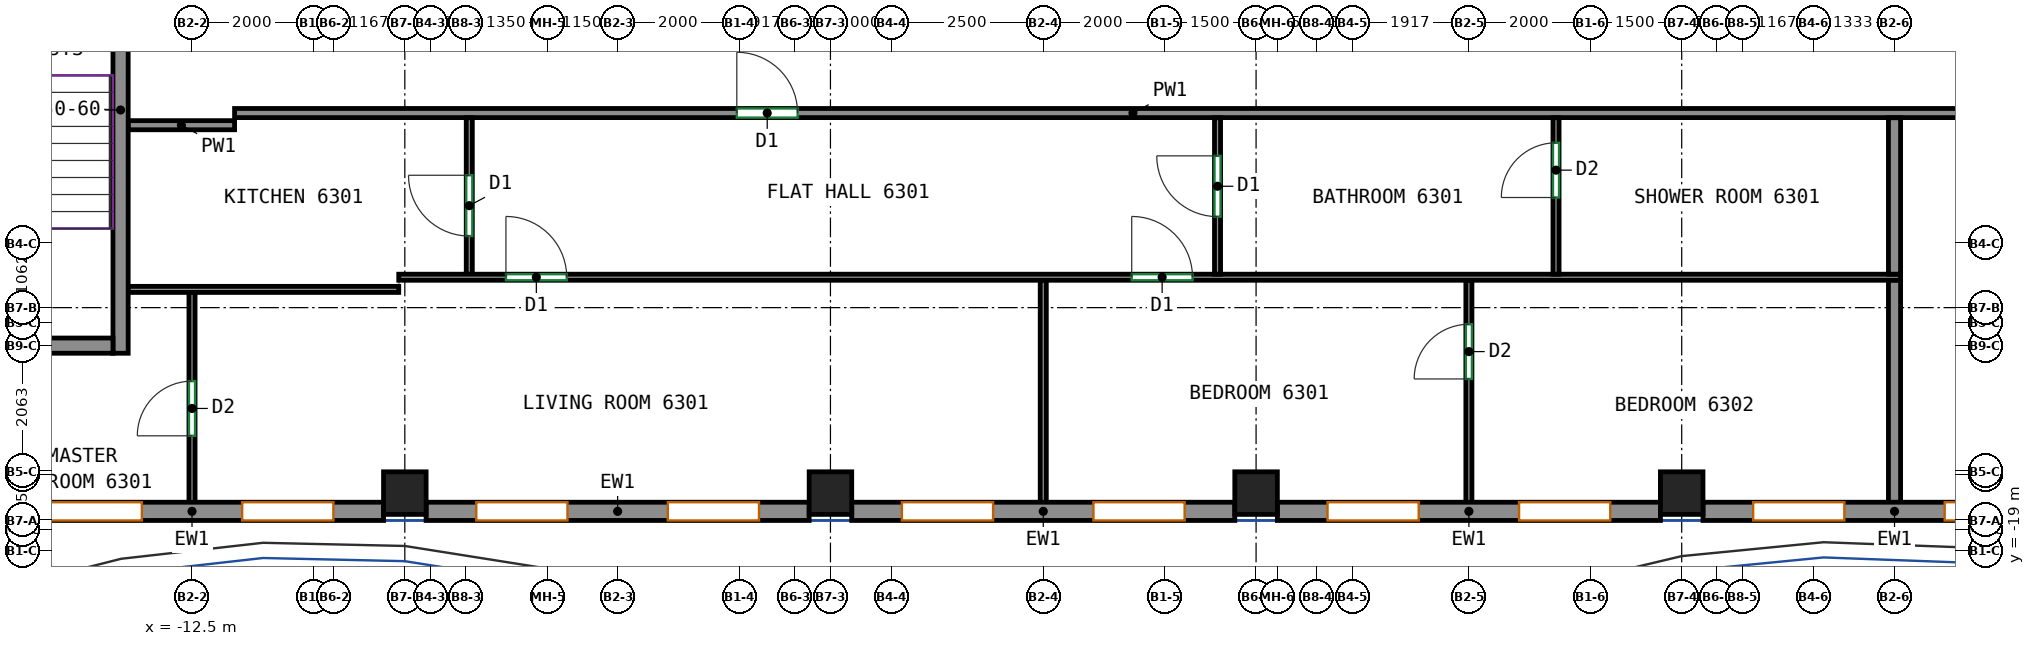
"""IFC4 building model, lengths in metres.
Left out: names, types, materials, properties, quantities, classifications, styles, units other than length and angle.
Written with IfcOpenShell. Run it as: python <this file> out.ifc"""

import sys

from ifc_helpers import new_model, si_unit, direction, frame, frame_2d, origin, origin_2d, place, context, subcontext, project, spatial, rectangle, extrude, source, transform, mapped, element, fill, save


model = new_model("IFC4")
c1 = context("Model", 3, precision=1e-05, world=origin(), true_north=direction((0.0, 1.0)))
c2 = subcontext(c1, "Body", "Model", "MODEL_VIEW")
j1 = project(units=[si_unit("LENGTHUNIT", "METRE"), si_unit("PLANEANGLEUNIT", "RADIAN")], contexts=[c1])
p1 = place(None, origin())
s1 = spatial("IfcSite", under=j1, at=p1, CompositionType="ELEMENT")
p2 = place(p1, origin())
s2 = spatial("IfcBuilding", under=s1, at=p2, CompositionType="ELEMENT")
p3 = place(p2, frame((0.0, 0.0, 259.4)))
s3 = spatial("IfcBuildingStorey", under=s2, at=p3, CompositionType="ELEMENT", Elevation=259.4)
m1 = source(origin(), c2, "Body", "SweptSolid", [
    extrude(rectangle(XDim=0.7, YDim=0.7, at=origin_2d()), origin(), (0.0, 0.0, 1.0), 3.0),
])
for number, where, z_axis, x_axis in (
    (1, (-9.0, -18.05, 0.0), (0.0, 0.0, 1.0), (1.0, 0.0, 0.0)),
    (2, (-2.0, -18.05, 0.0), (0.0, 0.0, 1.0), (1.0, 0.0, 0.0)),
    (3, (5.0, -18.05, 0.0), (0.0, 0.0, 1.0), (1.0, 0.0, 0.0)),
    (4, (12.0, -18.05, 0.0), (0.0, 0.0, 1.0), (1.0, 0.0, 0.0)),
):
    element("IfcColumn", number, at=place(p3, frame(where, z_axis=z_axis, x_axis=x_axis)), inside=s3, PredefinedType="COLUMN", context=c2, shape_type="MappedRepresentation", body=[
        mapped(m1, transform((0.0, 0.0, 0.0))),
    ])
m2 = source(origin(), c2, "Body", "SweptSolid", [
    extrude(rectangle(XDim=8.0, YDim=0.25, at=frame_2d((4.0, 0.0))), origin(), (0.0, 0.0, 1.0), 3.0),
])
p4 = place(p3, frame((-13.675, -15.75, 0.0), z_axis=(0.0, 0.0, 1.0), x_axis=(0.0, 1.0, 0.0)))
e5 = element("IfcWall", 5, at=p4, inside=s3, PredefinedType="SHEAR", context=c2, shape_type="MappedRepresentation", body=[
    mapped(m2, transform((0.0, 0.0, 0.0))),
])
m3 = source(origin(), c2, "Body", "SweptSolid", [
    extrude(rectangle(XDim=3.7, YDim=0.25, at=frame_2d((1.85, 0.0))), origin(), (0.0, 0.0, 1.0), 3.0),
])
p5 = place(p3, frame((-17.5, -15.625, 0.0), z_axis=(0.0, 0.0, 1.0), x_axis=(1.0, 0.0, 0.0)))
e6 = element("IfcWall", 6, at=p5, inside=s3, PredefinedType="SHEAR", context=c2, shape_type="MappedRepresentation", body=[
    mapped(m3, transform((0.0, 0.0, 0.0))),
])
p6 = place(p5, frame((1.25, 0.0, 0.0)))
e7 = element("IfcOpeningElement", 7, at=p6, cuts=e6, PredefinedType="OPENING", context=c2, shape_type="SweptSolid", body=[
    extrude(rectangle(XDim=1.2, YDim=2.1, at=frame_2d((0.6, 1.05))), frame((0.0, 0.135, 0.0), z_axis=(0.0, -1.0, 0.0), x_axis=(1.0, 0.0, 0.0)), (0.0, 0.0, 1.0), 0.27),
])
m4 = source(origin(), c2, "Body", "SweptSolid", [
    extrude(rectangle(XDim=6.3, YDim=0.3, at=frame_2d((3.15, 0.0))), origin(), (0.0, 0.0, 1.0), 3.0),
])
p7 = place(p3, frame((-15.65, -18.35, 0.0), z_axis=(0.0, 0.0, 1.0), x_axis=(1.0, 0.0, 0.0)))
e8 = element("IfcWall", 8, at=p7, inside=s3, PredefinedType="SOLIDWALL", context=c2, shape_type="MappedRepresentation", body=[
    mapped(m4, transform((0.0, 0.0, 0.0))),
])
p8 = place(p7, frame((0.825, 0.0, 0.8)))
e9 = element("IfcOpeningElement", 9, at=p8, cuts=e8, PredefinedType="OPENING", context=c2, shape_type="SweptSolid", body=[
    extrude(rectangle(XDim=1.5, YDim=2.05, at=frame_2d((0.75, 1.025))), frame((0.0, 0.16, 0.0), z_axis=(0.0, -1.0, 0.0), x_axis=(1.0, 0.0, 0.0)), (0.0, 0.0, 1.0), 0.32),
])
p9 = place(p7, frame((3.975, 0.0, 0.8)))
e10 = element("IfcOpeningElement", 10, at=p9, cuts=e8, PredefinedType="OPENING", context=c2, shape_type="SweptSolid", body=[
    extrude(rectangle(XDim=1.5, YDim=2.05, at=frame_2d((0.75, 1.025))), frame((0.0, 0.16, 0.0), z_axis=(0.0, -1.0, 0.0), x_axis=(1.0, 0.0, 0.0)), (0.0, 0.0, 1.0), 0.32),
])
p10 = place(p3, frame((-8.65, -18.35, 0.0), z_axis=(0.0, 0.0, 1.0), x_axis=(1.0, 0.0, 0.0)))
e11 = element("IfcWall", 11, at=p10, inside=s3, PredefinedType="SOLIDWALL", context=c2, shape_type="MappedRepresentation", body=[
    mapped(m4, transform((0.0, 0.0, 0.0))),
])
p11 = place(p10, frame((0.825, 0.0, 0.8)))
e12 = element("IfcOpeningElement", 12, at=p11, cuts=e11, PredefinedType="OPENING", context=c2, shape_type="SweptSolid", body=[
    extrude(rectangle(XDim=1.5, YDim=2.05, at=frame_2d((0.75, 1.025))), frame((0.0, 0.16, 0.0), z_axis=(0.0, -1.0, 0.0), x_axis=(1.0, 0.0, 0.0)), (0.0, 0.0, 1.0), 0.32),
])
p12 = place(p10, frame((3.975, 0.0, 0.8)))
e13 = element("IfcOpeningElement", 13, at=p12, cuts=e11, PredefinedType="OPENING", context=c2, shape_type="SweptSolid", body=[
    extrude(rectangle(XDim=1.5, YDim=2.05, at=frame_2d((0.75, 1.025))), frame((0.0, 0.16, 0.0), z_axis=(0.0, -1.0, 0.0), x_axis=(1.0, 0.0, 0.0)), (0.0, 0.0, 1.0), 0.32),
])
p13 = place(p3, frame((-1.65, -18.35, 0.0), z_axis=(0.0, 0.0, 1.0), x_axis=(1.0, 0.0, 0.0)))
e14 = element("IfcWall", 14, at=p13, inside=s3, PredefinedType="SOLIDWALL", context=c2, shape_type="MappedRepresentation", body=[
    mapped(m4, transform((0.0, 0.0, 0.0))),
])
p14 = place(p13, frame((0.825, 0.0, 0.8)))
e15 = element("IfcOpeningElement", 15, at=p14, cuts=e14, PredefinedType="OPENING", context=c2, shape_type="SweptSolid", body=[
    extrude(rectangle(XDim=1.5, YDim=2.05, at=frame_2d((0.75, 1.025))), frame((0.0, 0.16, 0.0), z_axis=(0.0, -1.0, 0.0), x_axis=(1.0, 0.0, 0.0)), (0.0, 0.0, 1.0), 0.32),
])
p15 = place(p13, frame((3.975, 0.0, 0.8)))
e16 = element("IfcOpeningElement", 16, at=p15, cuts=e14, PredefinedType="OPENING", context=c2, shape_type="SweptSolid", body=[
    extrude(rectangle(XDim=1.5, YDim=2.05, at=frame_2d((0.75, 1.025))), frame((0.0, 0.16, 0.0), z_axis=(0.0, -1.0, 0.0), x_axis=(1.0, 0.0, 0.0)), (0.0, 0.0, 1.0), 0.32),
])
p16 = place(p3, frame((5.35, -18.35, 0.0), z_axis=(0.0, 0.0, 1.0), x_axis=(1.0, 0.0, 0.0)))
e17 = element("IfcWall", 17, at=p16, inside=s3, PredefinedType="SOLIDWALL", context=c2, shape_type="MappedRepresentation", body=[
    mapped(m4, transform((0.0, 0.0, 0.0))),
])
p17 = place(p16, frame((0.825, 0.0, 0.8)))
e18 = element("IfcOpeningElement", 18, at=p17, cuts=e17, PredefinedType="OPENING", context=c2, shape_type="SweptSolid", body=[
    extrude(rectangle(XDim=1.5, YDim=2.05, at=frame_2d((0.75, 1.025))), frame((0.0, 0.16, 0.0), z_axis=(0.0, -1.0, 0.0), x_axis=(1.0, 0.0, 0.0)), (0.0, 0.0, 1.0), 0.32),
])
p18 = place(p16, frame((3.975, 0.0, 0.8)))
e19 = element("IfcOpeningElement", 19, at=p18, cuts=e17, PredefinedType="OPENING", context=c2, shape_type="SweptSolid", body=[
    extrude(rectangle(XDim=1.5, YDim=2.05, at=frame_2d((0.75, 1.025))), frame((0.0, 0.16, 0.0), z_axis=(0.0, -1.0, 0.0), x_axis=(1.0, 0.0, 0.0)), (0.0, 0.0, 1.0), 0.32),
])
p19 = place(p3, frame((12.35, -18.35, 0.0), z_axis=(0.0, 0.0, 1.0), x_axis=(1.0, 0.0, 0.0)))
e20 = element("IfcWall", 20, at=p19, inside=s3, PredefinedType="SOLIDWALL", context=c2, shape_type="MappedRepresentation", body=[
    mapped(m4, transform((0.0, 0.0, 0.0))),
])
p20 = place(p19, frame((0.825, 0.0, 0.8)))
e21 = element("IfcOpeningElement", 21, at=p20, cuts=e20, PredefinedType="OPENING", context=c2, shape_type="SweptSolid", body=[
    extrude(rectangle(XDim=1.5, YDim=2.05, at=frame_2d((0.75, 1.025))), frame((0.0, 0.16, 0.0), z_axis=(0.0, -1.0, 0.0), x_axis=(1.0, 0.0, 0.0)), (0.0, 0.0, 1.0), 0.32),
])
p21 = place(p19, frame((3.975, 0.0, 0.8)))
e22 = element("IfcOpeningElement", 22, at=p21, cuts=e20, PredefinedType="OPENING", context=c2, shape_type="SweptSolid", body=[
    extrude(rectangle(XDim=1.5, YDim=2.05, at=frame_2d((0.75, 1.025))), frame((0.0, 0.16, 0.0), z_axis=(0.0, -1.0, 0.0), x_axis=(1.0, 0.0, 0.0)), (0.0, 0.0, 1.0), 0.32),
])
p22 = place(p3, frame((-11.8, -11.8, 0.0), z_axis=(0.0, 0.0, 1.0), x_axis=(1.0, 0.0, 0.0)))
e23 = element("IfcWall", 23, at=p22, inside=s3, PredefinedType="PARTITIONING", context=c2, shape_type="SweptSolid", body=[
    extrude(rectangle(XDim=29.55, YDim=0.15, at=frame_2d((14.775, 0.0))), origin(), (0.0, 0.0, 1.0), 3.0),
])
p23 = place(p22, frame((8.26, 0.0, 0.0)))
e24 = element("IfcOpeningElement", 24, at=p23, cuts=e23, PredefinedType="OPENING", context=c2, shape_type="SweptSolid", body=[
    extrude(rectangle(XDim=1.0, YDim=2.1, at=frame_2d((0.5, 1.05))), frame((0.0, 0.085, 0.0), z_axis=(0.0, -1.0, 0.0), x_axis=(1.0, 0.0, 0.0)), (0.0, 0.0, 1.0), 0.17),
])
p24 = place(p3, frame((-13.55, -12.0, 0.0), z_axis=(0.0, 0.0, 1.0), x_axis=(1.0, 0.0, 0.0)))
e25 = element("IfcWall", 25, at=p24, inside=s3, PredefinedType="PARTITIONING", context=c2, shape_type="SweptSolid", body=[
    extrude(rectangle(XDim=1.75, YDim=0.15, at=frame_2d((0.875, 0.0))), origin(), (0.0, 0.0, 1.0), 3.0),
])
p25 = place(p3, frame((-7.94, -14.45, 0.0), z_axis=(0.0, 0.0, 1.0), x_axis=(0.0, 1.0, 0.0)))
e26 = element("IfcWall", 26, at=p25, inside=s3, PredefinedType="PARTITIONING", context=c2, shape_type="SweptSolid", body=[
    extrude(rectangle(XDim=2.573, YDim=0.1, at=frame_2d((1.287, 0.0))), origin(), (0.0, 0.0, 1.0), 3.0),
])
p26 = place(p25, frame((0.627, 0.0, 0.0)))
e27 = element("IfcOpeningElement", 27, at=p26, cuts=e26, PredefinedType="OPENING", context=c2, shape_type="SweptSolid", body=[
    extrude(rectangle(XDim=1.0, YDim=2.1, at=frame_2d((0.5, 1.05))), frame((0.0, 0.06, 0.0), z_axis=(0.0, -1.0, 0.0), x_axis=(1.0, 0.0, 0.0)), (0.0, 0.0, 1.0), 0.12),
])
p27 = place(p3, frame((-13.55, -14.7, 0.0), z_axis=(0.0, 0.0, 1.0), x_axis=(1.0, 0.0, 0.0)))
e28 = element("IfcWall", 28, at=p27, inside=s3, PredefinedType="PARTITIONING", context=c2, shape_type="SweptSolid", body=[
    extrude(rectangle(XDim=4.45, YDim=0.1, at=frame_2d((2.225, 0.0))), origin(), (0.0, 0.0, 1.0), 3.0),
])
p28 = place(p3, frame((-9.1, -14.5, 0.0), z_axis=(0.0, 0.0, 1.0), x_axis=(1.0, 0.0, 0.0)))
e29 = element("IfcWall", 29, at=p28, inside=s3, PredefinedType="PARTITIONING", context=c2, shape_type="SweptSolid", body=[
    extrude(rectangle(XDim=24.7, YDim=0.1, at=frame_2d((12.35, 0.0))), origin(), (0.0, 0.0, 1.0), 3.0),
])
p29 = place(p28, frame((1.763, 0.0, 0.0)))
e30 = element("IfcOpeningElement", 30, at=p29, cuts=e29, PredefinedType="OPENING", context=c2, shape_type="SweptSolid", body=[
    extrude(rectangle(XDim=1.0, YDim=2.1, at=frame_2d((0.5, 1.05))), frame((0.0, 0.06, 0.0), z_axis=(0.0, -1.0, 0.0), x_axis=(1.0, 0.0, 0.0)), (0.0, 0.0, 1.0), 0.12),
])
p30 = place(p28, frame((12.055, 0.0, 0.0)))
e31 = element("IfcOpeningElement", 31, at=p30, cuts=e29, PredefinedType="OPENING", context=c2, shape_type="SweptSolid", body=[
    extrude(rectangle(XDim=1.0, YDim=2.1, at=frame_2d((0.5, 1.05))), frame((0.0, 0.06, 0.0), z_axis=(0.0, -1.0, 0.0), x_axis=(1.0, 0.0, 0.0)), (0.0, 0.0, 1.0), 0.12),
])
p31 = place(p3, frame((4.366, -14.45, 0.0), z_axis=(0.0, 0.0, 1.0), x_axis=(0.0, 1.0, 0.0)))
e32 = element("IfcWall", 32, at=p31, inside=s3, PredefinedType="PARTITIONING", context=c2, shape_type="SweptSolid", body=[
    extrude(rectangle(XDim=2.573, YDim=0.1, at=frame_2d((1.287, 0.0))), origin(), (0.0, 0.0, 1.0), 3.0),
])
p32 = place(p31, frame((0.946, 0.0, 0.0)))
e33 = element("IfcOpeningElement", 33, at=p32, cuts=e32, PredefinedType="OPENING", context=c2, shape_type="SweptSolid", body=[
    extrude(rectangle(XDim=1.0, YDim=2.1, at=frame_2d((0.5, 1.05))), frame((0.0, 0.06, 0.0), z_axis=(0.0, -1.0, 0.0), x_axis=(1.0, 0.0, 0.0)), (0.0, 0.0, 1.0), 0.12),
])
p33 = place(p3, frame((9.933, -14.45, 0.0), z_axis=(0.0, 0.0, 1.0), x_axis=(0.0, 1.0, 0.0)))
e34 = element("IfcWall", 34, at=p33, inside=s3, PredefinedType="PARTITIONING", context=c2, shape_type="SweptSolid", body=[
    extrude(rectangle(XDim=2.573, YDim=0.1, at=frame_2d((1.287, 0.0))), origin(), (0.0, 0.0, 1.0), 3.0),
])
p34 = place(p33, frame((1.261, 0.0, 0.0)))
e35 = element("IfcOpeningElement", 35, at=p34, cuts=e34, PredefinedType="OPENING", context=c2, shape_type="SweptSolid", body=[
    extrude(rectangle(XDim=0.9, YDim=2.1, at=frame_2d((0.45, 1.05))), frame((0.0, 0.06, 0.0), z_axis=(0.0, -1.0, 0.0), x_axis=(1.0, 0.0, 0.0)), (0.0, 0.0, 1.0), 0.12),
])
p35 = place(p3, frame((15.5, -14.45, 0.0), z_axis=(0.0, 0.0, 1.0), x_axis=(0.0, 1.0, 0.0)))
e36 = element("IfcWall", 36, at=p35, inside=s3, PredefinedType="PARTITIONING", context=c2, shape_type="SweptSolid", body=[
    extrude(rectangle(XDim=2.573, YDim=0.2, at=frame_2d((1.287, 0.0))), origin(), (0.0, 0.0, 1.0), 3.0),
])
p36 = place(p3, frame((-12.5, -18.25, 0.0), z_axis=(0.0, 0.0, 1.0), x_axis=(0.0, 1.0, 0.0)))
e37 = element("IfcWall", 37, at=p36, inside=s3, PredefinedType="PARTITIONING", context=c2, shape_type="SweptSolid", body=[
    extrude(rectangle(XDim=3.498, YDim=0.1, at=frame_2d((1.749, 0.0))), origin(), (0.0, 0.0, 1.0), 3.0),
])
p37 = place(p36, frame((1.142, 0.0, 0.0)))
e38 = element("IfcOpeningElement", 38, at=p37, cuts=e37, PredefinedType="OPENING", context=c2, shape_type="SweptSolid", body=[
    extrude(rectangle(XDim=0.9, YDim=2.1, at=frame_2d((0.45, 1.05))), frame((0.0, 0.06, 0.0), z_axis=(0.0, -1.0, 0.0), x_axis=(1.0, 0.0, 0.0)), (0.0, 0.0, 1.0), 0.12),
])
p38 = place(p3, frame((1.5, -18.25, 0.0), z_axis=(0.0, 0.0, 1.0), x_axis=(0.0, 1.0, 0.0)))
e39 = element("IfcWall", 39, at=p38, inside=s3, PredefinedType="PARTITIONING", context=c2, shape_type="SweptSolid", body=[
    extrude(rectangle(XDim=3.698, YDim=0.1, at=frame_2d((1.849, 0.0))), origin(), (0.0, 0.0, 1.0), 3.0),
])
p39 = place(p3, frame((8.5, -18.25, 0.0), z_axis=(0.0, 0.0, 1.0), x_axis=(0.0, 1.0, 0.0)))
e40 = element("IfcWall", 40, at=p39, inside=s3, PredefinedType="PARTITIONING", context=c2, shape_type="SweptSolid", body=[
    extrude(rectangle(XDim=3.698, YDim=0.1, at=frame_2d((1.849, 0.0))), origin(), (0.0, 0.0, 1.0), 3.0),
])
p40 = place(p39, frame((2.077, 0.0, 0.0)))
e41 = element("IfcOpeningElement", 41, at=p40, cuts=e40, PredefinedType="OPENING", context=c2, shape_type="SweptSolid", body=[
    extrude(rectangle(XDim=0.9, YDim=2.1, at=frame_2d((0.45, 1.05))), frame((0.0, 0.06, 0.0), z_axis=(0.0, -1.0, 0.0), x_axis=(1.0, 0.0, 0.0)), (0.0, 0.0, 1.0), 0.12),
])
p41 = place(p3, frame((15.5, -18.25, 0.0), z_axis=(0.0, 0.0, 1.0), x_axis=(0.0, 1.0, 0.0)))
e42 = element("IfcWall", 42, at=p41, inside=s3, PredefinedType="PARTITIONING", context=c2, shape_type="SweptSolid", body=[
    extrude(rectangle(XDim=3.698, YDim=0.2, at=frame_2d((1.849, 0.0))), origin(), (0.0, 0.0, 1.0), 3.0),
])
p42 = place(p8, origin())
e43 = element("IfcWindow", 43, at=p42, inside=s3, PartitioningType="SINGLE_PANEL", PredefinedType="WINDOW", context=c2, shape_type="SweptSolid", body=[
    extrude(rectangle(XDim=1.5, YDim=2.05, at=frame_2d((0.75, 1.025))), frame((0.0, 0.03, 0.0), z_axis=(0.0, -1.0, 0.0), x_axis=(1.0, 0.0, 0.0)), (0.0, 0.0, 1.0), 0.06),
])
fill(e9, e43)
p43 = place(p9, origin())
e44 = element("IfcWindow", 44, at=p43, inside=s3, PartitioningType="SINGLE_PANEL", PredefinedType="WINDOW", context=c2, shape_type="SweptSolid", body=[
    extrude(rectangle(XDim=1.5, YDim=2.05, at=frame_2d((0.75, 1.025))), frame((0.0, 0.03, 0.0), z_axis=(0.0, -1.0, 0.0), x_axis=(1.0, 0.0, 0.0)), (0.0, 0.0, 1.0), 0.06),
])
fill(e10, e44)
p44 = place(p11, origin())
e45 = element("IfcWindow", 45, at=p44, inside=s3, PartitioningType="SINGLE_PANEL", PredefinedType="WINDOW", context=c2, shape_type="SweptSolid", body=[
    extrude(rectangle(XDim=1.5, YDim=2.05, at=frame_2d((0.75, 1.025))), frame((0.0, 0.03, 0.0), z_axis=(0.0, -1.0, 0.0), x_axis=(1.0, 0.0, 0.0)), (0.0, 0.0, 1.0), 0.06),
])
fill(e12, e45)
p45 = place(p12, origin())
e46 = element("IfcWindow", 46, at=p45, inside=s3, PartitioningType="SINGLE_PANEL", PredefinedType="WINDOW", context=c2, shape_type="SweptSolid", body=[
    extrude(rectangle(XDim=1.5, YDim=2.05, at=frame_2d((0.75, 1.025))), frame((0.0, 0.03, 0.0), z_axis=(0.0, -1.0, 0.0), x_axis=(1.0, 0.0, 0.0)), (0.0, 0.0, 1.0), 0.06),
])
fill(e13, e46)
p46 = place(p14, origin())
e47 = element("IfcWindow", 47, at=p46, inside=s3, PartitioningType="SINGLE_PANEL", PredefinedType="WINDOW", context=c2, shape_type="SweptSolid", body=[
    extrude(rectangle(XDim=1.5, YDim=2.05, at=frame_2d((0.75, 1.025))), frame((0.0, 0.03, 0.0), z_axis=(0.0, -1.0, 0.0), x_axis=(1.0, 0.0, 0.0)), (0.0, 0.0, 1.0), 0.06),
])
fill(e15, e47)
p47 = place(p15, origin())
e48 = element("IfcWindow", 48, at=p47, inside=s3, PartitioningType="SINGLE_PANEL", PredefinedType="WINDOW", context=c2, shape_type="SweptSolid", body=[
    extrude(rectangle(XDim=1.5, YDim=2.05, at=frame_2d((0.75, 1.025))), frame((0.0, 0.03, 0.0), z_axis=(0.0, -1.0, 0.0), x_axis=(1.0, 0.0, 0.0)), (0.0, 0.0, 1.0), 0.06),
])
fill(e16, e48)
p48 = place(p17, origin())
e49 = element("IfcWindow", 49, at=p48, inside=s3, PartitioningType="SINGLE_PANEL", PredefinedType="WINDOW", context=c2, shape_type="SweptSolid", body=[
    extrude(rectangle(XDim=1.5, YDim=2.05, at=frame_2d((0.75, 1.025))), frame((0.0, 0.03, 0.0), z_axis=(0.0, -1.0, 0.0), x_axis=(1.0, 0.0, 0.0)), (0.0, 0.0, 1.0), 0.06),
])
fill(e18, e49)
p49 = place(p18, origin())
e50 = element("IfcWindow", 50, at=p49, inside=s3, PartitioningType="SINGLE_PANEL", PredefinedType="WINDOW", context=c2, shape_type="SweptSolid", body=[
    extrude(rectangle(XDim=1.5, YDim=2.05, at=frame_2d((0.75, 1.025))), frame((0.0, 0.03, 0.0), z_axis=(0.0, -1.0, 0.0), x_axis=(1.0, 0.0, 0.0)), (0.0, 0.0, 1.0), 0.06),
])
fill(e19, e50)
p50 = place(p20, origin())
e51 = element("IfcWindow", 51, at=p50, inside=s3, PartitioningType="SINGLE_PANEL", PredefinedType="WINDOW", context=c2, shape_type="SweptSolid", body=[
    extrude(rectangle(XDim=1.5, YDim=2.05, at=frame_2d((0.75, 1.025))), frame((0.0, 0.03, 0.0), z_axis=(0.0, -1.0, 0.0), x_axis=(1.0, 0.0, 0.0)), (0.0, 0.0, 1.0), 0.06),
])
fill(e21, e51)
p51 = place(p21, origin())
e52 = element("IfcWindow", 52, at=p51, inside=s3, PartitioningType="SINGLE_PANEL", PredefinedType="WINDOW", context=c2, shape_type="SweptSolid", body=[
    extrude(rectangle(XDim=1.5, YDim=2.05, at=frame_2d((0.75, 1.025))), frame((0.0, 0.03, 0.0), z_axis=(0.0, -1.0, 0.0), x_axis=(1.0, 0.0, 0.0)), (0.0, 0.0, 1.0), 0.06),
])
fill(e22, e52)
p52 = place(p37, origin())
e53 = element("IfcDoor", 53, at=p52, inside=s3, OperationType="SINGLE_SWING_LEFT", PredefinedType="DOOR", context=c2, shape_type="SweptSolid", body=[
    extrude(rectangle(XDim=0.9, YDim=2.1, at=frame_2d((0.45, 1.05))), frame((0.0, 0.025, 0.0), z_axis=(0.0, -1.0, 0.0), x_axis=(1.0, 0.0, 0.0)), (0.0, 0.0, 1.0), 0.05),
])
fill(e38, e53)
p53 = place(p40, origin())
e54 = element("IfcDoor", 54, at=p53, inside=s3, OperationType="SINGLE_SWING_LEFT", PredefinedType="DOOR", context=c2, shape_type="SweptSolid", body=[
    extrude(rectangle(XDim=0.9, YDim=2.1, at=frame_2d((0.45, 1.05))), frame((0.0, 0.025, 0.0), z_axis=(0.0, -1.0, 0.0), x_axis=(1.0, 0.0, 0.0)), (0.0, 0.0, 1.0), 0.05),
])
fill(e41, e54)
p54 = place(p29, origin())
e55 = element("IfcDoor", 55, at=p54, inside=s3, OperationType="SINGLE_SWING_LEFT", PredefinedType="DOOR", context=c2, shape_type="SweptSolid", body=[
    extrude(rectangle(XDim=1.0, YDim=2.1, at=frame_2d((0.5, 1.05))), frame((0.0, 0.025, 0.0), z_axis=(0.0, -1.0, 0.0), x_axis=(1.0, 0.0, 0.0)), (0.0, 0.0, 1.0), 0.05),
])
fill(e30, e55)
p55 = place(p30, origin())
e56 = element("IfcDoor", 56, at=p55, inside=s3, OperationType="SINGLE_SWING_LEFT", PredefinedType="DOOR", context=c2, shape_type="SweptSolid", body=[
    extrude(rectangle(XDim=1.0, YDim=2.1, at=frame_2d((0.5, 1.05))), frame((0.0, 0.025, 0.0), z_axis=(0.0, -1.0, 0.0), x_axis=(1.0, 0.0, 0.0)), (0.0, 0.0, 1.0), 0.05),
])
fill(e31, e56)
p56 = place(p26, origin())
e57 = element("IfcDoor", 57, at=p56, inside=s3, OperationType="SINGLE_SWING_RIGHT", PredefinedType="DOOR", context=c2, shape_type="SweptSolid", body=[
    extrude(rectangle(XDim=1.0, YDim=2.1, at=frame_2d((0.5, 1.05))), frame((0.0, 0.025, 0.0), z_axis=(0.0, -1.0, 0.0), x_axis=(1.0, 0.0, 0.0)), (0.0, 0.0, 1.0), 0.05),
])
fill(e27, e57)
p57 = place(p32, origin())
e58 = element("IfcDoor", 58, at=p57, inside=s3, OperationType="SINGLE_SWING_RIGHT", PredefinedType="DOOR", context=c2, shape_type="SweptSolid", body=[
    extrude(rectangle(XDim=1.0, YDim=2.1, at=frame_2d((0.5, 1.05))), frame((0.0, 0.025, 0.0), z_axis=(0.0, -1.0, 0.0), x_axis=(1.0, 0.0, 0.0)), (0.0, 0.0, 1.0), 0.05),
])
fill(e33, e58)
p58 = place(p34, origin())
e59 = element("IfcDoor", 59, at=p58, inside=s3, OperationType="SINGLE_SWING_LEFT", PredefinedType="DOOR", context=c2, shape_type="SweptSolid", body=[
    extrude(rectangle(XDim=0.9, YDim=2.1, at=frame_2d((0.45, 1.05))), frame((0.0, 0.025, 0.0), z_axis=(0.0, -1.0, 0.0), x_axis=(1.0, 0.0, 0.0)), (0.0, 0.0, 1.0), 0.05),
])
fill(e35, e59)
p59 = place(p23, origin())
e60 = element("IfcDoor", 60, at=p59, inside=s3, OperationType="SINGLE_SWING_LEFT", PredefinedType="DOOR", context=c2, shape_type="SweptSolid", body=[
    extrude(rectangle(XDim=1.0, YDim=2.1, at=frame_2d((0.5, 1.05))), frame((0.0, 0.025, 0.0), z_axis=(0.0, -1.0, 0.0), x_axis=(1.0, 0.0, 0.0)), (0.0, 0.0, 1.0), 0.05),
])
fill(e24, e60)
save(model, sys.argv[1])
